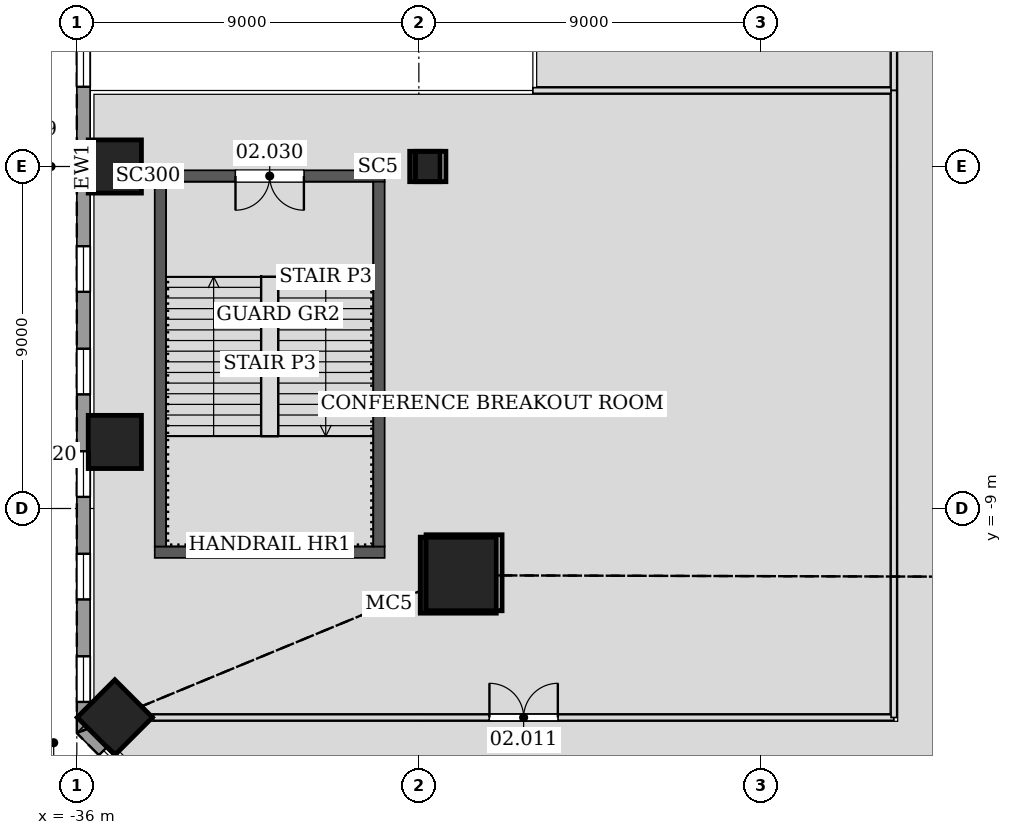
"""IFC4 building model, lengths in metres.
Left out: names, types, materials, properties, quantities, classifications, styles, units other than length and angle.
Written with IfcOpenShell. Run it as: python <this file> out.ifc"""

import sys

from ifc_helpers import new_model, si_unit, direction, frame, frame_2d, origin, origin_2d, place, context, subcontext, project, spatial, rectangle, hollow_rectangle, extrude, element, fill, save


model = new_model("IFC4")
c1 = context("Model", 3, precision=1e-05, world=origin(), true_north=direction((0.0, 1.0)))
c2 = subcontext(c1, "Body", "Model", "MODEL_VIEW")
j1 = project(units=[si_unit("LENGTHUNIT", "METRE"), si_unit("PLANEANGLEUNIT", "RADIAN")], contexts=[c1])
p1 = place(None, origin())
s1 = spatial("IfcSite", under=j1, at=p1, CompositionType="ELEMENT")
p2 = place(p1, origin())
s2 = spatial("IfcBuilding", under=s1, at=p2, CompositionType="ELEMENT")
p3 = place(p2, frame((0.0, 0.0, 13.2)))
s3 = spatial("IfcBuildingStorey", under=s2, at=p3, CompositionType="ELEMENT", Elevation=13.2)
p4 = place(p3, frame((-25.963, -10.754, 0.0), z_axis=(0.028288195063, 0.011703901791, 0.999531288506), x_axis=(-0.3823083337, 0.92403481427, 0.0)))
e1 = element("IfcColumn", 1, at=p4, inside=s3, PredefinedType="COLUMN", context=c2, shape_type="SweptSolid", body=[
    extrude(hollow_rectangle(XDim=2.0, YDim=2.0, WallThickness=0.09, at=origin_2d()), origin(), (0.0, 0.0, 1.0), 5.403),
])
p5 = place(p3, frame((-26.841, 0.0, 0.0), z_axis=(0.028290132739, 0.0, 0.999599754096), x_axis=(0.0, 1.0, 0.0)))
e2 = element("IfcColumn", 2, at=p5, inside=s3, PredefinedType="COLUMN", context=c2, shape_type="SweptSolid", body=[
    extrude(hollow_rectangle(XDim=0.8, YDim=0.8, WallThickness=0.05, at=origin_2d()), origin(), (0.0, 0.0, 1.0), 5.402),
])
for number, where, z_axis, x_axis in (
    (3, (-35.0, 0.0, 0.0), (0.0, 0.0, 1.0), (1.0, 0.0, 0.0)),
    (4, (-35.0, -7.249, 0.0), (0.0, 0.0, 1.0), (1.0, 0.0, 0.0)),
    (5, (-35.0, -14.498, 0.0), (0.0, 0.0, 1.0), (0.707, 0.707, 0.0)),
):
    element("IfcColumn", number, at=place(p3, frame(where, z_axis=z_axis, x_axis=x_axis)), inside=s3, PredefinedType="COLUMN", context=c2, shape_type="SweptSolid", body=[
        extrude(rectangle(XDim=1.4, YDim=1.4, at=origin_2d()), origin(), (0.0, 0.0, 1.0), 5.4),
    ])
p6 = place(p3, frame((-33.95, -10.15, 0.0), z_axis=(0.0, 0.0, 1.0), x_axis=(1.0, 0.0, 0.0)))
e6 = element("IfcWall", 6, at=p6, inside=s3, PredefinedType="SOLIDWALL", context=c2, shape_type="SweptSolid", body=[
    extrude(rectangle(XDim=6.05, YDim=0.3, at=frame_2d((3.025, 0.0))), origin(), (0.0, 0.0, 1.0), 5.4),
])
p7 = place(p3, frame((-27.9, -0.25, 0.0), z_axis=(0.0, 0.0, 1.0), x_axis=(-1.0, 0.0, 0.0)))
e7 = element("IfcWall", 7, at=p7, inside=s3, PredefinedType="SOLIDWALL", context=c2, shape_type="SweptSolid", body=[
    extrude(rectangle(XDim=6.05, YDim=0.3, at=frame_2d((3.025, 0.0))), origin(), (0.0, 0.0, 1.0), 5.4),
])
p8 = place(p7, frame((2.125, 0.0, 0.0)))
e8 = element("IfcOpeningElement", 8, at=p8, cuts=e7, PredefinedType="OPENING", context=c2, shape_type="SweptSolid", body=[
    extrude(rectangle(XDim=1.8, YDim=2.1, at=frame_2d((0.9, 1.05))), frame((0.0, 0.16, 0.0), z_axis=(0.0, -1.0, 0.0), x_axis=(1.0, 0.0, 0.0)), (0.0, 0.0, 1.0), 0.32),
])
p9 = place(p3, frame((-33.95, -0.25, 0.0), z_axis=(0.0, 0.0, 1.0), x_axis=(-1.0, 0.0, 0.0)))
e9 = element("IfcWall", 9, at=p9, inside=s3, PredefinedType="SOLIDWALL", context=c2, shape_type="SweptSolid", body=[
    extrude(rectangle(XDim=0.35, YDim=0.3, at=frame_2d((0.175, 0.0))), origin(), (0.0, 0.0, 1.0), 4.744),
])
for number, where, z_axis, x_axis in (
    (10, (-33.8, -0.4, 0.0), (0.0, 0.0, 1.0), (0.0, -1.0, 0.0)),
    (11, (-28.05, -10.0, 0.0), (0.0, 0.0, 1.0), (0.0, 1.0, 0.0)),
):
    element("IfcWall", number, at=place(p3, frame(where, z_axis=z_axis, x_axis=x_axis)), inside=s3, PredefinedType="SOLIDWALL", context=c2, shape_type="SweptSolid", body=[
        extrude(rectangle(XDim=9.6, YDim=0.3, at=frame_2d((4.8, 0.0))), origin(), (0.0, 0.0, 1.0), 5.4),
    ])
p10 = place(p3, frame((-35.825, 14.912, 0.0), z_axis=(0.0, 0.0, 1.0), x_axis=(0.0, -1.0, 0.0)))
e12 = element("IfcWall", 12, at=p10, inside=s3, PredefinedType="SOLIDWALL", context=c2, shape_type="SweptSolid", body=[
    extrude(rectangle(XDim=29.823, YDim=0.35, at=frame_2d((14.912, 0.0))), origin(), (0.0, 0.0, 1.0), 5.1),
])
p11 = place(p10, frame((0.822, 0.0, 0.9)))
e13 = element("IfcOpeningElement", 13, at=p11, cuts=e12, PredefinedType="OPENING", context=c2, shape_type="SweptSolid", body=[
    extrude(rectangle(XDim=1.2, YDim=3.6, at=frame_2d((0.6, 1.8))), frame((0.0, 0.185, 0.0), z_axis=(0.0, -1.0, 0.0), x_axis=(1.0, 0.0, 0.0)), (0.0, 0.0, 1.0), 0.37),
])
p12 = place(p10, frame((3.52, 0.0, 0.9)))
e14 = element("IfcOpeningElement", 14, at=p12, cuts=e12, PredefinedType="OPENING", context=c2, shape_type="SweptSolid", body=[
    extrude(rectangle(XDim=1.2, YDim=3.6, at=frame_2d((0.6, 1.8))), frame((0.0, 0.185, 0.0), z_axis=(0.0, -1.0, 0.0), x_axis=(1.0, 0.0, 0.0)), (0.0, 0.0, 1.0), 0.37),
])
p13 = place(p10, frame((6.218, 0.0, 0.9)))
e15 = element("IfcOpeningElement", 15, at=p13, cuts=e12, PredefinedType="OPENING", context=c2, shape_type="SweptSolid", body=[
    extrude(rectangle(XDim=1.2, YDim=3.6, at=frame_2d((0.6, 1.8))), frame((0.0, 0.185, 0.0), z_axis=(0.0, -1.0, 0.0), x_axis=(1.0, 0.0, 0.0)), (0.0, 0.0, 1.0), 0.37),
])
p14 = place(p10, frame((8.916, 0.0, 0.9)))
e16 = element("IfcOpeningElement", 16, at=p14, cuts=e12, PredefinedType="OPENING", context=c2, shape_type="SweptSolid", body=[
    extrude(rectangle(XDim=1.2, YDim=3.6, at=frame_2d((0.6, 1.8))), frame((0.0, 0.185, 0.0), z_axis=(0.0, -1.0, 0.0), x_axis=(1.0, 0.0, 0.0)), (0.0, 0.0, 1.0), 0.37),
])
p15 = place(p10, frame((11.614, 0.0, 0.9)))
e17 = element("IfcOpeningElement", 17, at=p15, cuts=e12, PredefinedType="OPENING", context=c2, shape_type="SweptSolid", body=[
    extrude(rectangle(XDim=1.2, YDim=3.6, at=frame_2d((0.6, 1.8))), frame((0.0, 0.185, 0.0), z_axis=(0.0, -1.0, 0.0), x_axis=(1.0, 0.0, 0.0)), (0.0, 0.0, 1.0), 0.37),
])
p16 = place(p10, frame((14.312, 0.0, 0.9)))
e18 = element("IfcOpeningElement", 18, at=p16, cuts=e12, PredefinedType="OPENING", context=c2, shape_type="SweptSolid", body=[
    extrude(rectangle(XDim=1.2, YDim=3.6, at=frame_2d((0.6, 1.8))), frame((0.0, 0.185, 0.0), z_axis=(0.0, -1.0, 0.0), x_axis=(1.0, 0.0, 0.0)), (0.0, 0.0, 1.0), 0.37),
])
p17 = place(p10, frame((17.01, 0.0, 0.9)))
e19 = element("IfcOpeningElement", 19, at=p17, cuts=e12, PredefinedType="OPENING", context=c2, shape_type="SweptSolid", body=[
    extrude(rectangle(XDim=1.2, YDim=3.6, at=frame_2d((0.6, 1.8))), frame((0.0, 0.185, 0.0), z_axis=(0.0, -1.0, 0.0), x_axis=(1.0, 0.0, 0.0)), (0.0, 0.0, 1.0), 0.37),
])
p18 = place(p10, frame((19.708, 0.0, 0.9)))
e20 = element("IfcOpeningElement", 20, at=p18, cuts=e12, PredefinedType="OPENING", context=c2, shape_type="SweptSolid", body=[
    extrude(rectangle(XDim=1.2, YDim=3.6, at=frame_2d((0.6, 1.8))), frame((0.0, 0.185, 0.0), z_axis=(0.0, -1.0, 0.0), x_axis=(1.0, 0.0, 0.0)), (0.0, 0.0, 1.0), 0.37),
])
p19 = place(p10, frame((22.406, 0.0, 0.9)))
e21 = element("IfcOpeningElement", 21, at=p19, cuts=e12, PredefinedType="OPENING", context=c2, shape_type="SweptSolid", body=[
    extrude(rectangle(XDim=1.2, YDim=3.6, at=frame_2d((0.6, 1.8))), frame((0.0, 0.185, 0.0), z_axis=(0.0, -1.0, 0.0), x_axis=(1.0, 0.0, 0.0)), (0.0, 0.0, 1.0), 0.37),
])
p20 = place(p10, frame((25.104, 0.0, 0.9)))
e22 = element("IfcOpeningElement", 22, at=p20, cuts=e12, PredefinedType="OPENING", context=c2, shape_type="SweptSolid", body=[
    extrude(rectangle(XDim=1.2, YDim=3.6, at=frame_2d((0.6, 1.8))), frame((0.0, 0.185, 0.0), z_axis=(0.0, -1.0, 0.0), x_axis=(1.0, 0.0, 0.0)), (0.0, 0.0, 1.0), 0.37),
])
p21 = place(p10, frame((27.802, 0.0, 0.9)))
e23 = element("IfcOpeningElement", 23, at=p21, cuts=e12, PredefinedType="OPENING", context=c2, shape_type="SweptSolid", body=[
    extrude(rectangle(XDim=1.2, YDim=3.6, at=frame_2d((0.6, 1.8))), frame((0.0, 0.185, 0.0), z_axis=(0.0, -1.0, 0.0), x_axis=(1.0, 0.0, 0.0)), (0.0, 0.0, 1.0), 0.37),
])
p22 = place(p3, frame((-35.876, -14.788, 0.0), z_axis=(0.0, 0.0, 1.0), x_axis=(0.707106781187, -0.707106781187, 0.0)))
e24 = element("IfcWall", 24, at=p22, inside=s3, PredefinedType="SOLIDWALL", context=c2, shape_type="SweptSolid", body=[
    extrude(rectangle(XDim=29.823, YDim=0.35, at=frame_2d((14.912, 0.0))), origin(), (0.0, 0.0, 1.0), 5.1),
])
p23 = place(p22, frame((0.822, 0.0, 0.9)))
e25 = element("IfcOpeningElement", 25, at=p23, cuts=e24, PredefinedType="OPENING", context=c2, shape_type="SweptSolid", body=[
    extrude(rectangle(XDim=1.2, YDim=3.6, at=frame_2d((0.6, 1.8))), frame((0.0, 0.185, 0.0), z_axis=(0.0, -1.0, 0.0), x_axis=(1.0, 0.0, 0.0)), (0.0, 0.0, 1.0), 0.37),
])
p24 = place(p22, frame((3.52, 0.0, 0.9)))
e26 = element("IfcOpeningElement", 26, at=p24, cuts=e24, PredefinedType="OPENING", context=c2, shape_type="SweptSolid", body=[
    extrude(rectangle(XDim=1.2, YDim=3.6, at=frame_2d((0.6, 1.8))), frame((0.0, 0.185, 0.0), z_axis=(0.0, -1.0, 0.0), x_axis=(1.0, 0.0, 0.0)), (0.0, 0.0, 1.0), 0.37),
])
p25 = place(p22, frame((6.218, 0.0, 0.9)))
e27 = element("IfcOpeningElement", 27, at=p25, cuts=e24, PredefinedType="OPENING", context=c2, shape_type="SweptSolid", body=[
    extrude(rectangle(XDim=1.2, YDim=3.6, at=frame_2d((0.6, 1.8))), frame((0.0, 0.185, 0.0), z_axis=(0.0, -1.0, 0.0), x_axis=(1.0, 0.0, 0.0)), (0.0, 0.0, 1.0), 0.37),
])
p26 = place(p22, frame((8.916, 0.0, 0.9)))
e28 = element("IfcOpeningElement", 28, at=p26, cuts=e24, PredefinedType="OPENING", context=c2, shape_type="SweptSolid", body=[
    extrude(rectangle(XDim=1.2, YDim=3.6, at=frame_2d((0.6, 1.8))), frame((0.0, 0.185, 0.0), z_axis=(0.0, -1.0, 0.0), x_axis=(1.0, 0.0, 0.0)), (0.0, 0.0, 1.0), 0.37),
])
p27 = place(p22, frame((11.614, 0.0, 0.9)))
e29 = element("IfcOpeningElement", 29, at=p27, cuts=e24, PredefinedType="OPENING", context=c2, shape_type="SweptSolid", body=[
    extrude(rectangle(XDim=1.2, YDim=3.6, at=frame_2d((0.6, 1.8))), frame((0.0, 0.185, 0.0), z_axis=(0.0, -1.0, 0.0), x_axis=(1.0, 0.0, 0.0)), (0.0, 0.0, 1.0), 0.37),
])
p28 = place(p22, frame((14.312, 0.0, 0.9)))
e30 = element("IfcOpeningElement", 30, at=p28, cuts=e24, PredefinedType="OPENING", context=c2, shape_type="SweptSolid", body=[
    extrude(rectangle(XDim=1.2, YDim=3.6, at=frame_2d((0.6, 1.8))), frame((0.0, 0.185, 0.0), z_axis=(0.0, -1.0, 0.0), x_axis=(1.0, 0.0, 0.0)), (0.0, 0.0, 1.0), 0.37),
])
p29 = place(p22, frame((17.01, 0.0, 0.9)))
e31 = element("IfcOpeningElement", 31, at=p29, cuts=e24, PredefinedType="OPENING", context=c2, shape_type="SweptSolid", body=[
    extrude(rectangle(XDim=1.2, YDim=3.6, at=frame_2d((0.6, 1.8))), frame((0.0, 0.185, 0.0), z_axis=(0.0, -1.0, 0.0), x_axis=(1.0, 0.0, 0.0)), (0.0, 0.0, 1.0), 0.37),
])
p30 = place(p22, frame((19.708, 0.0, 0.9)))
e32 = element("IfcOpeningElement", 32, at=p30, cuts=e24, PredefinedType="OPENING", context=c2, shape_type="SweptSolid", body=[
    extrude(rectangle(XDim=1.2, YDim=3.6, at=frame_2d((0.6, 1.8))), frame((0.0, 0.185, 0.0), z_axis=(0.0, -1.0, 0.0), x_axis=(1.0, 0.0, 0.0)), (0.0, 0.0, 1.0), 0.37),
])
p31 = place(p22, frame((22.406, 0.0, 0.9)))
e33 = element("IfcOpeningElement", 33, at=p31, cuts=e24, PredefinedType="OPENING", context=c2, shape_type="SweptSolid", body=[
    extrude(rectangle(XDim=1.2, YDim=3.6, at=frame_2d((0.6, 1.8))), frame((0.0, 0.185, 0.0), z_axis=(0.0, -1.0, 0.0), x_axis=(1.0, 0.0, 0.0)), (0.0, 0.0, 1.0), 0.37),
])
p32 = place(p22, frame((25.104, 0.0, 0.9)))
e34 = element("IfcOpeningElement", 34, at=p32, cuts=e24, PredefinedType="OPENING", context=c2, shape_type="SweptSolid", body=[
    extrude(rectangle(XDim=1.2, YDim=3.6, at=frame_2d((0.6, 1.8))), frame((0.0, 0.185, 0.0), z_axis=(0.0, -1.0, 0.0), x_axis=(1.0, 0.0, 0.0)), (0.0, 0.0, 1.0), 0.37),
])
p33 = place(p22, frame((27.802, 0.0, 0.9)))
e35 = element("IfcOpeningElement", 35, at=p33, cuts=e24, PredefinedType="OPENING", context=c2, shape_type="SweptSolid", body=[
    extrude(rectangle(XDim=1.2, YDim=3.6, at=frame_2d((0.6, 1.8))), frame((0.0, 0.185, 0.0), z_axis=(0.0, -1.0, 0.0), x_axis=(1.0, 0.0, 0.0)), (0.0, 0.0, 1.0), 0.37),
])
p34 = place(p3, frame((-24.0, 2.0, 0.0), z_axis=(0.0, 0.0, 1.0), x_axis=(1.0, 0.0, 0.0)))
e36 = element("IfcWall", 36, at=p34, inside=s3, PredefinedType="PARTITIONING", context=c2, shape_type="SweptSolid", body=[
    extrude(rectangle(XDim=9.5, YDim=0.15, at=frame_2d((4.75, 0.0))), origin(), (0.0, 0.0, 1.0), 4.231),
])
p35 = place(p3, frame((-14.5, 2.0, 0.0), z_axis=(0.0, 0.0, 1.0), x_axis=(0.0, 1.0, 0.0)))
e37 = element("IfcWall", 37, at=p35, inside=s3, PredefinedType="PARTITIONING", context=c2, shape_type="SweptSolid", body=[
    extrude(rectangle(XDim=4.25, YDim=0.15, at=frame_2d((2.125, 0.0))), origin(), (0.0, 0.0, 1.0), 5.1),
])
p36 = place(p35, frame((1.675, 0.0, 0.0)))
e38 = element("IfcOpeningElement", 38, at=p36, cuts=e37, PredefinedType="OPENING", context=c2, shape_type="SweptSolid", body=[
    extrude(rectangle(XDim=0.9, YDim=2.1, at=frame_2d((0.45, 1.05))), frame((0.0, 0.085, 0.0), z_axis=(0.0, -1.0, 0.0), x_axis=(1.0, 0.0, 0.0)), (0.0, 0.0, 1.0), 0.17),
])
p37 = place(p3, frame((-33.986, -14.5, 0.0), z_axis=(0.0, 0.0, 1.0), x_axis=(1.0, 0.0, 0.0)))
e39 = element("IfcWall", 39, at=p37, inside=s3, PredefinedType="PARTITIONING", context=c2, shape_type="SweptSolid", body=[
    extrude(rectangle(XDim=19.486, YDim=0.15, at=frame_2d((9.743, 0.0))), origin(), (0.0, 0.0, 1.0), 4.049),
])
p38 = place(p37, frame((8.843, 0.0, 0.0)))
e40 = element("IfcOpeningElement", 40, at=p38, cuts=e39, PredefinedType="OPENING", context=c2, shape_type="SweptSolid", body=[
    extrude(rectangle(XDim=1.8, YDim=2.4, at=frame_2d((0.9, 1.2))), frame((0.0, 0.085, 0.0), z_axis=(0.0, -1.0, 0.0), x_axis=(1.0, 0.0, 0.0)), (0.0, 0.0, 1.0), 0.17),
])
p39 = place(p3, frame((-14.5, -14.5, 0.0), z_axis=(0.0, 0.0, 1.0), x_axis=(0.0, 1.0, 0.0)))
e41 = element("IfcWall", 41, at=p39, inside=s3, PredefinedType="PARTITIONING", context=c2, shape_type="SweptSolid", body=[
    extrude(rectangle(XDim=16.5, YDim=0.15, at=frame_2d((8.25, 0.0))), origin(), (0.0, 0.0, 1.0), 3.79),
])
p40 = place(p15, origin())
e42 = element("IfcWindow", 42, at=p40, inside=s3, PartitioningType="SINGLE_PANEL", PredefinedType="WINDOW", context=c2, shape_type="SweptSolid", body=[
    extrude(rectangle(XDim=1.2, YDim=3.6, at=frame_2d((0.6, 1.8))), frame((0.0, 0.03, 0.0), z_axis=(0.0, -1.0, 0.0), x_axis=(1.0, 0.0, 0.0)), (0.0, 0.0, 1.0), 0.06),
])
fill(e17, e42)
p41 = place(p16, origin())
e43 = element("IfcWindow", 43, at=p41, inside=s3, PartitioningType="SINGLE_PANEL", PredefinedType="WINDOW", context=c2, shape_type="SweptSolid", body=[
    extrude(rectangle(XDim=1.2, YDim=3.6, at=frame_2d((0.6, 1.8))), frame((0.0, 0.03, 0.0), z_axis=(0.0, -1.0, 0.0), x_axis=(1.0, 0.0, 0.0)), (0.0, 0.0, 1.0), 0.06),
])
fill(e18, e43)
p42 = place(p17, origin())
e44 = element("IfcWindow", 44, at=p42, inside=s3, PartitioningType="SINGLE_PANEL", PredefinedType="WINDOW", context=c2, shape_type="SweptSolid", body=[
    extrude(rectangle(XDim=1.2, YDim=3.6, at=frame_2d((0.6, 1.8))), frame((0.0, 0.03, 0.0), z_axis=(0.0, -1.0, 0.0), x_axis=(1.0, 0.0, 0.0)), (0.0, 0.0, 1.0), 0.06),
])
fill(e19, e44)
p43 = place(p18, origin())
e45 = element("IfcWindow", 45, at=p43, inside=s3, PartitioningType="SINGLE_PANEL", PredefinedType="WINDOW", context=c2, shape_type="SweptSolid", body=[
    extrude(rectangle(XDim=1.2, YDim=3.6, at=frame_2d((0.6, 1.8))), frame((0.0, 0.03, 0.0), z_axis=(0.0, -1.0, 0.0), x_axis=(1.0, 0.0, 0.0)), (0.0, 0.0, 1.0), 0.06),
])
fill(e20, e45)
p44 = place(p19, origin())
e46 = element("IfcWindow", 46, at=p44, inside=s3, PartitioningType="SINGLE_PANEL", PredefinedType="WINDOW", context=c2, shape_type="SweptSolid", body=[
    extrude(rectangle(XDim=1.2, YDim=3.6, at=frame_2d((0.6, 1.8))), frame((0.0, 0.03, 0.0), z_axis=(0.0, -1.0, 0.0), x_axis=(1.0, 0.0, 0.0)), (0.0, 0.0, 1.0), 0.06),
])
fill(e21, e46)
p45 = place(p20, origin())
e47 = element("IfcWindow", 47, at=p45, inside=s3, PartitioningType="SINGLE_PANEL", PredefinedType="WINDOW", context=c2, shape_type="SweptSolid", body=[
    extrude(rectangle(XDim=1.2, YDim=3.6, at=frame_2d((0.6, 1.8))), frame((0.0, 0.03, 0.0), z_axis=(0.0, -1.0, 0.0), x_axis=(1.0, 0.0, 0.0)), (0.0, 0.0, 1.0), 0.06),
])
fill(e22, e47)
p46 = place(p21, origin())
e48 = element("IfcWindow", 48, at=p46, inside=s3, PartitioningType="SINGLE_PANEL", PredefinedType="WINDOW", context=c2, shape_type="SweptSolid", body=[
    extrude(rectangle(XDim=1.2, YDim=3.6, at=frame_2d((0.6, 1.8))), frame((0.0, 0.03, 0.0), z_axis=(0.0, -1.0, 0.0), x_axis=(1.0, 0.0, 0.0)), (0.0, 0.0, 1.0), 0.06),
])
fill(e23, e48)
p47 = place(p23, origin())
e49 = element("IfcWindow", 49, at=p47, inside=s3, PartitioningType="SINGLE_PANEL", PredefinedType="WINDOW", context=c2, shape_type="SweptSolid", body=[
    extrude(rectangle(XDim=1.2, YDim=3.6, at=frame_2d((0.6, 1.8))), frame((0.0, 0.03, 0.0), z_axis=(0.0, -1.0, 0.0), x_axis=(1.0, 0.0, 0.0)), (0.0, 0.0, 1.0), 0.06),
])
fill(e25, e49)
p48 = place(p38, origin())
e50 = element("IfcDoor", 50, at=p48, inside=s3, OperationType="DOUBLE_DOOR_SINGLE_SWING", PredefinedType="DOOR", context=c2, shape_type="SweptSolid", body=[
    extrude(rectangle(XDim=1.8, YDim=2.4, at=frame_2d((0.9, 1.2))), frame((0.0, 0.025, 0.0), z_axis=(0.0, -1.0, 0.0), x_axis=(1.0, 0.0, 0.0)), (0.0, 0.0, 1.0), 0.05),
])
fill(e40, e50)
p49 = place(p8, origin())
e51 = element("IfcDoor", 51, at=p49, inside=s3, OperationType="DOUBLE_DOOR_SINGLE_SWING", PredefinedType="DOOR", context=c2, shape_type="SweptSolid", body=[
    extrude(rectangle(XDim=1.8, YDim=2.1, at=frame_2d((0.9, 1.05))), frame((0.0, 0.025, 0.0), z_axis=(0.0, -1.0, 0.0), x_axis=(1.0, 0.0, 0.0)), (0.0, 0.0, 1.0), 0.05),
])
fill(e8, e51)
save(model, sys.argv[1])
